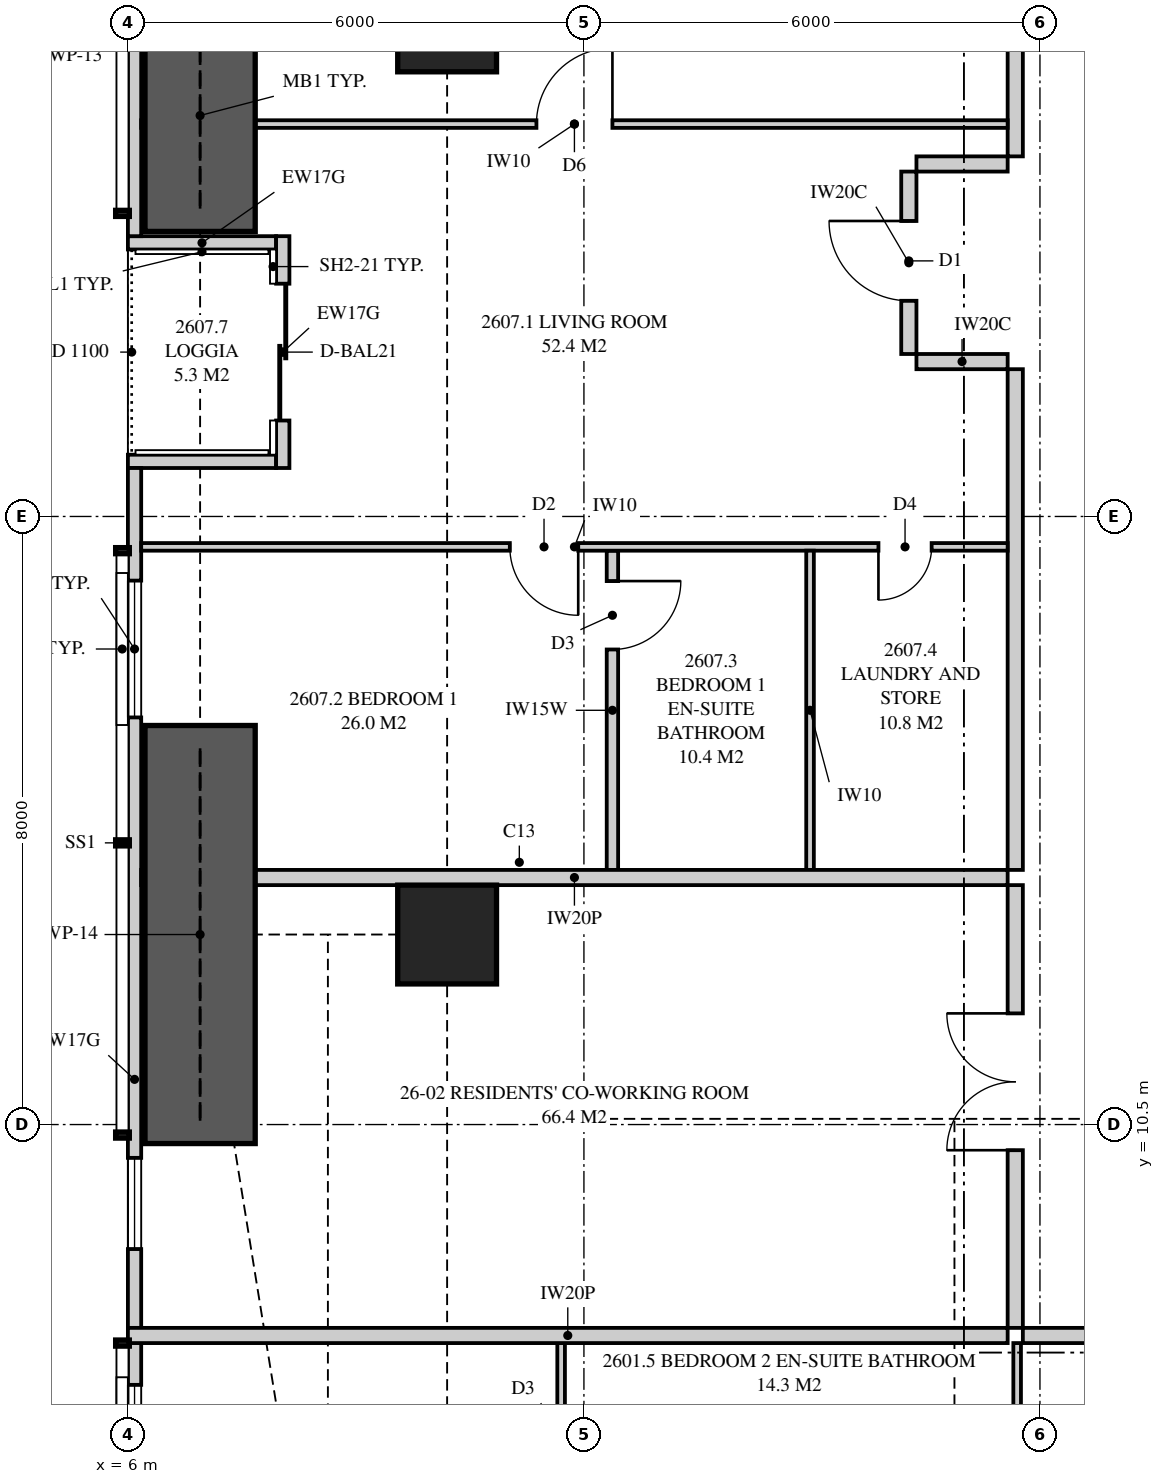
"""IFC4 building model, lengths in metres.
Left out: names, types, materials, properties, quantities, classifications, styles, units other than length and angle.
Written with IfcOpenShell. Run it as: python <this file> out.ifc"""

import sys

from ifc_helpers import new_model, si_unit, direction, frame, frame_2d, origin, origin_2d, place, context, subcontext, project, spatial, polyline, rectangle, outline, extrude, element, fill, save


model = new_model("IFC4")
c1 = context("Model", 3, precision=1e-05, world=origin(), true_north=direction((0.0, 1.0)))
c2 = subcontext(c1, "Body", "Model", "MODEL_VIEW")
j1 = project(units=[si_unit("LENGTHUNIT", "METRE"), si_unit("PLANEANGLEUNIT", "RADIAN")], contexts=[c1])
p1 = place(None, origin())
s1 = spatial("IfcSite", under=j1, at=p1, CompositionType="ELEMENT")
p2 = place(p1, origin())
s2 = spatial("IfcBuilding", under=s1, at=p2, CompositionType="ELEMENT")
p3 = place(p2, frame((0.0, 0.0, 98.15)))
s3 = spatial("IfcBuildingStorey", under=s2, at=p3, CompositionType="ELEMENT", Elevation=98.15)
for number, where, z_axis, x_axis in (
    (1, (10.2, 13.0, 0.0), (0.0, 0.0, 1.0), (1.0, 0.0, 0.0)),
    (2, (10.2, 25.0, 0.0), (0.0, 0.0, 1.0), (1.0, 0.0, 0.0)),
):
    element("IfcColumn", number, at=place(p3, frame(where, z_axis=z_axis, x_axis=x_axis)), inside=s3, PredefinedType="COLUMN", context=c2, shape_type="SweptSolid", body=[
        extrude(rectangle(XDim=1.3, YDim=1.3, at=origin_2d()), origin(), (0.0, 0.0, 1.0), 3.35),
    ])
p4 = place(p3, frame((6.087, 34.949, 0.0), z_axis=(0.0, 0.0, 1.0), x_axis=(0.0, -1.0, 0.0)))
e3 = element("IfcWall", 3, at=p4, inside=s3, PredefinedType="SOLIDWALL", context=c2, shape_type="SweptSolid", body=[
    extrude(outline(polyline([(0.0, 0.0), (12.761, 0.0), (12.761, 2.15), (9.949, 2.15), (9.949, 3.11), (9.823, 3.11), (9.823, 2.15), (9.73, 2.15), (9.73, 3.11), (0.0, 3.11), (0.0, 0.0)])), frame((0.0, 0.087, 0.0), z_axis=(0.0, -1.0, 0.0), x_axis=(1.0, 0.0, 0.0)), (0.0, 0.0, 1.0), 0.175),
])
p5 = place(p4, frame((2.724, 0.0, 0.4)))
e4 = element("IfcOpeningElement", 4, at=p5, cuts=e3, PredefinedType="OPENING", context=c2, shape_type="SweptSolid", body=[
    extrude(rectangle(XDim=1.8, YDim=1.7, at=frame_2d((0.9, 0.85))), frame((0.0, 0.097, 0.0), z_axis=(0.0, -1.0, 0.0), x_axis=(1.0, 0.0, 0.0)), (0.0, 0.0, 1.0), 0.195),
])
p6 = place(p4, frame((5.874, 0.0, 0.4)))
e5 = element("IfcOpeningElement", 5, at=p6, cuts=e3, PredefinedType="OPENING", context=c2, shape_type="SweptSolid", body=[
    extrude(rectangle(XDim=1.2, YDim=1.7, at=frame_2d((0.6, 0.85))), frame((0.0, 0.097, 0.0), z_axis=(0.0, -1.0, 0.0), x_axis=(1.0, 0.0, 0.0)), (0.0, 0.0, 1.0), 0.195),
])
p7 = place(p3, frame((6.087, 19.137, 0.0), z_axis=(0.0, 0.0, 1.0), x_axis=(0.0, -1.0, 0.0)))
e6 = element("IfcWall", 6, at=p7, inside=s3, PredefinedType="SOLIDWALL", context=c2, shape_type="SweptSolid", body=[
    extrude(outline(polyline([(0.0, 0.0), (16.086, 0.0), (16.086, 3.11), (6.356, 3.11), (6.356, 2.15), (6.263, 2.15), (6.263, 3.11), (6.137, 3.11), (6.137, 2.15), (0.0, 2.15), (0.0, 0.0)])), frame((0.0, 0.087, 0.0), z_axis=(0.0, -1.0, 0.0), x_axis=(1.0, 0.0, 0.0)), (0.0, 0.0, 1.0), 0.175),
])
p8 = place(p7, frame((1.481, 0.0, 0.4)))
e7 = element("IfcOpeningElement", 7, at=p8, cuts=e6, PredefinedType="OPENING", context=c2, shape_type="SweptSolid", body=[
    extrude(rectangle(XDim=1.8, YDim=1.7, at=frame_2d((0.9, 0.85))), frame((0.0, 0.097, 0.0), z_axis=(0.0, -1.0, 0.0), x_axis=(1.0, 0.0, 0.0)), (0.0, 0.0, 1.0), 0.195),
])
p9 = place(p7, frame((9.076, 0.0, 0.4)))
e8 = element("IfcOpeningElement", 8, at=p9, cuts=e6, PredefinedType="OPENING", context=c2, shape_type="SweptSolid", body=[
    extrude(rectangle(XDim=1.2, YDim=1.7, at=frame_2d((0.6, 0.85))), frame((0.0, 0.097, 0.0), z_axis=(0.0, -1.0, 0.0), x_axis=(1.0, 0.0, 0.0)), (0.0, 0.0, 1.0), 0.195),
])
p10 = place(p7, frame((12.062, 0.0, 0.4)))
e9 = element("IfcOpeningElement", 9, at=p10, cuts=e6, PredefinedType="OPENING", context=c2, shape_type="SweptSolid", body=[
    extrude(rectangle(XDim=1.8, YDim=1.7, at=frame_2d((0.9, 0.85))), frame((0.0, 0.097, 0.0), z_axis=(0.0, -1.0, 0.0), x_axis=(1.0, 0.0, 0.0)), (0.0, 0.0, 1.0), 0.195),
])
p11 = place(p3, frame((8.038, 22.188, 0.0), z_axis=(0.0, 0.0, 1.0), x_axis=(0.0, -1.0, 0.0)))
e10 = element("IfcWall", 10, at=p11, inside=s3, PredefinedType="SOLIDWALL", context=c2, shape_type="SweptSolid", body=[
    extrude(rectangle(XDim=3.05, YDim=0.175, at=frame_2d((1.525, 0.0))), origin(), (0.0, 0.0, 1.0), 3.11),
])
p12 = place(p11, frame((0.625, 0.0, 0.0)))
e11 = element("IfcOpeningElement", 11, at=p12, cuts=e10, PredefinedType="OPENING", context=c2, shape_type="SweptSolid", body=[
    extrude(rectangle(XDim=1.8, YDim=2.1, at=frame_2d((0.9, 1.05))), frame((0.0, 0.097, 0.0), z_axis=(0.0, -1.0, 0.0), x_axis=(1.0, 0.0, 0.0)), (0.0, 0.0, 1.0), 0.195),
])
for number, where, z_axis, x_axis in (
    (12, (6.0, 22.1, 0.0), (0.0, 0.0, 1.0), (1.0, 0.0, 0.0)),
    (13, (6.0, 19.225, 0.0), (0.0, 0.0, 1.0), (1.0, 0.0, 0.0)),
):
    element("IfcWall", number, at=place(p3, frame(where, z_axis=z_axis, x_axis=x_axis)), inside=s3, PredefinedType="SOLIDWALL", context=c2, shape_type="SweptSolid", body=[
        extrude(outline(polyline([(0.0, 0.0), (1.95, 0.0), (1.95, 3.11), (1.75, 3.11), (1.75, 2.15), (0.15, 2.15), (0.15, 3.11), (0.0, 3.11), (0.0, 0.0)])), frame((0.0, 0.087, 0.0), z_axis=(0.0, -1.0, 0.0), x_axis=(1.0, 0.0, 0.0)), (0.0, 0.0, 1.0), 0.175),
    ])
p13 = place(p3, frame((17.775, 7.725, 0.0), z_axis=(0.0, 0.0, 1.0), x_axis=(1.0, 0.0, 0.0)))
e14 = element("IfcWall", 14, at=p13, inside=s3, PredefinedType="PARTITIONING", context=c2, shape_type="SweptSolid", body=[
    extrude(rectangle(XDim=4.325, YDim=0.2, at=frame_2d((2.163, 0.0))), origin(), (0.0, 0.0, 1.0), 3.11),
])
p14 = place(p3, frame((11.7, 0.175, 0.0), z_axis=(0.0, 0.0, 1.0), x_axis=(0.0, 1.0, 0.0)))
e15 = element("IfcWall", 15, at=p14, inside=s3, PredefinedType="PARTITIONING", context=c2, shape_type="SweptSolid", body=[
    extrude(outline(polyline([(0.0, 0.0), (7.45, 0.0), (7.45, 3.11), (2.708, 3.11), (2.708, 2.15), (0.953, 2.15), (0.953, 3.11), (0.0, 3.11), (0.0, 0.0)])), frame((0.0, 0.05, 0.0), z_axis=(0.0, -1.0, 0.0), x_axis=(1.0, 0.0, 0.0)), (0.0, 0.0, 1.0), 0.1),
])
p15 = place(p14, frame((2.701, 0.0, 0.0)))
e16 = element("IfcOpeningElement", 16, at=p15, cuts=e15, PredefinedType="OPENING", context=c2, shape_type="SweptSolid", body=[
    extrude(rectangle(XDim=0.9, YDim=2.1, at=frame_2d((0.45, 1.05))), frame((0.0, 0.06, 0.0), z_axis=(0.0, -1.0, 0.0), x_axis=(1.0, 0.0, 0.0)), (0.0, 0.0, 1.0), 0.12),
])
p16 = place(p14, frame((5.525, 0.0, 0.0)))
e17 = element("IfcOpeningElement", 17, at=p16, cuts=e15, PredefinedType="OPENING", context=c2, shape_type="SweptSolid", body=[
    extrude(rectangle(XDim=0.9, YDim=2.1, at=frame_2d((0.45, 1.05))), frame((0.0, 0.06, 0.0), z_axis=(0.0, -1.0, 0.0), x_axis=(1.0, 0.0, 0.0)), (0.0, 0.0, 1.0), 0.12),
])
p17 = place(p3, frame((17.7, 0.175, 0.0), z_axis=(0.0, 0.0, 1.0), x_axis=(0.0, 1.0, 0.0)))
e18 = element("IfcWall", 18, at=p17, inside=s3, PredefinedType="PARTITIONING", context=c2, shape_type="SweptSolid", body=[
    extrude(outline(polyline([(1.635, 2.15), (0.0, 2.15), (0.0, 0.0), (7.45, 0.0), (7.45, 3.11), (1.635, 3.11), (1.635, 2.15)]), holes=[polyline([(1.021, 0.116), (0.529, 0.116), (0.529, 0.906), (1.021, 0.906), (1.021, 0.116)]), polyline([(1.021, 1.244), (0.529, 1.244), (0.529, 2.034), (1.021, 2.034), (1.021, 1.244)])]), frame((0.0, 0.05, 0.0), z_axis=(0.0, -1.0, 0.0), x_axis=(1.0, 0.0, 0.0)), (0.0, 0.0, 1.0), 0.1),
])
p18 = place(p17, frame((3.6, 0.0, 0.0)))
e19 = element("IfcOpeningElement", 19, at=p18, cuts=e18, PredefinedType="OPENING", context=c2, shape_type="SweptSolid", body=[
    extrude(rectangle(XDim=0.9, YDim=2.1, at=frame_2d((0.45, 1.05))), frame((0.0, 0.06, 0.0), z_axis=(0.0, -1.0, 0.0), x_axis=(1.0, 0.0, 0.0)), (0.0, 0.0, 1.0), 0.12),
])
p19 = place(p3, frame((6.0, 7.725, 0.0), z_axis=(0.0, 0.0, 1.0), x_axis=(1.0, 0.0, 0.0)))
e20 = element("IfcWall", 20, at=p19, inside=s3, PredefinedType="PARTITIONING", context=c2, shape_type="SweptSolid", body=[
    extrude(outline(polyline([(0.0, 0.0), (11.575, 0.0), (11.575, 3.11), (11.212, 3.11), (11.212, 2.541), (10.538, 2.541), (10.538, 3.11), (5.51, 3.11), (5.51, 2.51), (2.969, 2.51), (2.969, 2.541), (2.727, 2.541), (2.727, 2.15), (0.884, 2.15), (0.884, 3.11), (0.0, 3.11), (0.0, 0.0)])), frame((0.0, 0.1, 0.0), z_axis=(0.0, -1.0, 0.0), x_axis=(1.0, 0.0, 0.0)), (0.0, 0.0, 1.0), 0.2),
])
p20 = place(p3, frame((6.175, 13.75, 0.0), z_axis=(0.0, 0.0, 1.0), x_axis=(1.0, 0.0, 0.0)))
e21 = element("IfcWall", 21, at=p20, inside=s3, PredefinedType="PARTITIONING", context=c2, shape_type="SweptSolid", body=[
    extrude(outline(polyline([(1.685, 2.15), (0.0, 2.15), (0.0, 0.0), (11.4, 0.0), (11.4, 3.11), (5.335, 3.11), (5.335, 2.51), (2.715, 2.51), (2.715, 3.11), (1.685, 3.11), (1.685, 2.15)]), holes=[polyline([(1.021, 0.133), (0.529, 0.133), (0.529, 0.991), (1.021, 0.991), (1.021, 0.133)]), polyline([(1.021, 1.159), (0.529, 1.159), (0.529, 2.017), (1.021, 2.017), (1.021, 1.159)])]), frame((0.0, 0.1, 0.0), z_axis=(0.0, -1.0, 0.0), x_axis=(1.0, 0.0, 0.0)), (0.0, 0.0, 1.0), 0.2),
])
p21 = place(p3, frame((17.675, 7.825, 0.0), z_axis=(0.0, 0.0, 1.0), x_axis=(0.0, 1.0, 0.0)))
e22 = element("IfcWall", 22, at=p21, inside=s3, PredefinedType="PARTITIONING", context=c2, shape_type="SweptSolid", body=[
    extrude(outline(polyline([(0.0, 0.0), (5.825, 0.0), (5.825, 3.11), (3.087, 3.11), (3.087, 2.541), (2.413, 2.541), (2.413, 3.11), (0.0, 3.11), (0.0, 0.0)])), frame((0.0, 0.1, 0.0), z_axis=(0.0, -1.0, 0.0), x_axis=(1.0, 0.0, 0.0)), (0.0, 0.0, 1.0), 0.2),
])
p22 = place(p21, frame((2.337, 0.0, 0.0)))
e23 = element("IfcOpeningElement", 23, at=p22, cuts=e22, PredefinedType="OPENING", context=c2, shape_type="SweptSolid", body=[
    extrude(rectangle(XDim=1.8, YDim=2.1, at=frame_2d((0.9, 1.05))), frame((0.0, 0.11, 0.0), z_axis=(0.0, -1.0, 0.0), x_axis=(1.0, 0.0, 0.0)), (0.0, 0.0, 1.0), 0.22),
])
p23 = place(p3, frame((17.675, 13.85, 0.0), z_axis=(0.0, 0.0, 1.0), x_axis=(0.0, 1.0, 0.0)))
e24 = element("IfcWall", 24, at=p23, inside=s3, PredefinedType="PARTITIONING", context=c2, shape_type="SweptSolid", body=[
    extrude(rectangle(XDim=6.587, YDim=0.2, at=frame_2d((3.294, 0.0))), origin(), (0.0, 0.0, 1.0), 3.11),
])
p24 = place(p3, frame((6.175, 18.1, 0.0), z_axis=(0.0, 0.0, 1.0), x_axis=(1.0, 0.0, 0.0)))
e25 = element("IfcWall", 25, at=p24, inside=s3, PredefinedType="PARTITIONING", context=c2, shape_type="SweptSolid", body=[
    extrude(outline(polyline([(0.0, 0.0), (11.4, 0.0), (11.4, 3.11), (5.285, 3.11), (5.285, 2.51), (2.765, 2.51), (2.765, 3.11), (1.635, 3.11), (1.635, 2.15), (0.0, 2.15), (0.0, 3.11), (0.0, 0.0)])), frame((0.0, 0.05, 0.0), z_axis=(0.0, -1.0, 0.0), x_axis=(1.0, 0.0, 0.0)), (0.0, 0.0, 1.0), 0.1),
])
p25 = place(p24, frame((4.85, 0.0, 0.0)))
e26 = element("IfcOpeningElement", 26, at=p25, cuts=e25, PredefinedType="OPENING", context=c2, shape_type="SweptSolid", body=[
    extrude(rectangle(XDim=0.9, YDim=2.1, at=frame_2d((0.45, 1.05))), frame((0.0, 0.06, 0.0), z_axis=(0.0, -1.0, 0.0), x_axis=(1.0, 0.0, 0.0)), (0.0, 0.0, 1.0), 0.12),
])
p26 = place(p24, frame((9.7, 0.0, 0.0)))
e27 = element("IfcOpeningElement", 27, at=p26, cuts=e25, PredefinedType="OPENING", context=c2, shape_type="SweptSolid", body=[
    extrude(rectangle(XDim=0.7, YDim=2.1, at=frame_2d((0.35, 1.05))), frame((0.0, 0.06, 0.0), z_axis=(0.0, -1.0, 0.0), x_axis=(1.0, 0.0, 0.0)), (0.0, 0.0, 1.0), 0.12),
])
p27 = place(p3, frame((12.375, 13.85, 0.0), z_axis=(0.0, 0.0, 1.0), x_axis=(0.0, 1.0, 0.0)))
e28 = element("IfcWall", 28, at=p27, inside=s3, PredefinedType="PLUMBINGWALL", context=c2, shape_type="SweptSolid", body=[
    extrude(rectangle(XDim=4.2, YDim=0.15, at=frame_2d((2.1, 0.0))), origin(), (0.0, 0.0, 1.0), 3.11),
])
p28 = place(p27, frame((2.9, 0.0, 0.0)))
e29 = element("IfcOpeningElement", 29, at=p28, cuts=e28, PredefinedType="OPENING", context=c2, shape_type="SweptSolid", body=[
    extrude(rectangle(XDim=0.9, YDim=2.1, at=frame_2d((0.45, 1.05))), frame((0.0, 0.085, 0.0), z_axis=(0.0, -1.0, 0.0), x_axis=(1.0, 0.0, 0.0)), (0.0, 0.0, 1.0), 0.17),
])
p29 = place(p3, frame((14.975, 13.85, 0.0), z_axis=(0.0, 0.0, 1.0), x_axis=(0.0, 1.0, 0.0)))
e30 = element("IfcWall", 30, at=p29, inside=s3, PredefinedType="PARTITIONING", context=c2, shape_type="SweptSolid", body=[
    extrude(rectangle(XDim=4.2, YDim=0.1, at=frame_2d((2.1, 0.0))), origin(), (0.0, 0.0, 1.0), 3.11),
])
p30 = place(p3, frame((6.175, 23.663, 0.0), z_axis=(0.0, 0.0, 1.0), x_axis=(1.0, 0.0, 0.0)))
e31 = element("IfcWall", 31, at=p30, inside=s3, PredefinedType="PARTITIONING", context=c2, shape_type="SweptSolid", body=[
    extrude(outline(polyline([(0.529, 2.15), (0.0, 2.15), (0.0, 0.0), (0.529, 0.0), (0.529, 0.556), (1.021, 0.556), (1.021, 0.0), (11.4, 0.0), (11.4, 3.11), (5.285, 3.11), (5.285, 2.51), (2.765, 2.51), (2.765, 3.11), (1.635, 3.11), (1.635, 2.15), (1.021, 2.15), (1.021, 1.594), (0.529, 1.594), (0.529, 2.15)])), frame((0.0, 0.05, 0.0), z_axis=(0.0, -1.0, 0.0), x_axis=(1.0, 0.0, 0.0)), (0.0, 0.0, 1.0), 0.1),
])
p31 = place(p30, frame((5.2, 0.0, 0.0)))
e32 = element("IfcOpeningElement", 32, at=p31, cuts=e31, PredefinedType="OPENING", context=c2, shape_type="SweptSolid", body=[
    extrude(rectangle(XDim=1.0, YDim=2.1, at=frame_2d((0.5, 1.05))), frame((0.0, 0.06, 0.0), z_axis=(0.0, -1.0, 0.0), x_axis=(1.0, 0.0, 0.0)), (0.0, 0.0, 1.0), 0.12),
])
p32 = place(p3, frame((17.675, 23.238, 0.0), z_axis=(0.0, 0.0, 1.0), x_axis=(0.0, 1.0, 0.0)))
e33 = element("IfcWall", 33, at=p32, inside=s3, PredefinedType="PARTITIONING", context=c2, shape_type="SweptSolid", body=[
    extrude(outline(polyline([(0.0, 0.0), (5.938, 0.0), (5.938, 3.11), (3.525, 3.11), (3.525, 2.541), (2.85, 2.541), (2.85, 3.11), (0.0, 3.11), (0.0, 0.0)])), frame((0.0, 0.1, 0.0), z_axis=(0.0, -1.0, 0.0), x_axis=(1.0, 0.0, 0.0)), (0.0, 0.0, 1.0), 0.2),
])
p33 = place(p3, frame((16.275, 20.637, 0.0), z_axis=(0.0, 0.0, 1.0), x_axis=(0.0, 1.0, 0.0)))
e34 = element("IfcWall", 34, at=p33, inside=s3, PredefinedType="PARTITIONING", context=c2, shape_type="SweptSolid", body=[
    extrude(rectangle(XDim=2.4, YDim=0.2, at=frame_2d((1.2, 0.0))), origin(), (0.0, 0.0, 1.0), 3.11),
])
p34 = place(p33, frame((0.7, 0.0, 0.0)))
e35 = element("IfcOpeningElement", 35, at=p34, cuts=e34, PredefinedType="OPENING", context=c2, shape_type="SweptSolid", body=[
    extrude(rectangle(XDim=1.05, YDim=2.2, at=frame_2d((0.525, 1.1))), frame((0.0, 0.11, 0.0), z_axis=(0.0, -1.0, 0.0), x_axis=(1.0, 0.0, 0.0)), (0.0, 0.0, 1.0), 0.22),
])
for number, where, z_axis, x_axis in (
    (36, (17.575, 20.538, 0.0), (0.0, 0.0, 1.0), (-1.0, 0.0, 0.0)),
    (37, (17.575, 23.137, 0.0), (0.0, 0.0, 1.0), (-1.0, 0.0, 0.0)),
):
    element("IfcWall", number, at=place(p3, frame(where, z_axis=z_axis, x_axis=x_axis)), inside=s3, PredefinedType="PARTITIONING", context=c2, shape_type="SweptSolid", body=[
        extrude(rectangle(XDim=1.2, YDim=0.2, at=frame_2d((0.6, 0.0))), origin(), (0.0, 0.0, 1.0), 3.11),
    ])
for number, where, z_axis, x_axis in (
    (38, (6.95, 22.25, 0.0), (0.0, 0.0, 1.0), (0.0, 1.0, 0.0)),
    (39, (6.95, 10.25, 0.0), (0.0, 0.0, 1.0), (0.0, 1.0, 0.0)),
):
    element("IfcWall", number, at=place(p3, frame(where, z_axis=z_axis, x_axis=x_axis)), inside=s3, PredefinedType="SHEAR", context=c2, shape_type="SweptSolid", body=[
        extrude(rectangle(XDim=5.5, YDim=1.45, at=frame_2d((2.75, 0.0))), origin(), (0.0, 0.0, 1.0), 3.35),
    ])
p35 = place(p12, origin())
e40 = element("IfcDoor", 40, at=p35, inside=s3, OperationType="SLIDING_TO_LEFT", PredefinedType="DOOR", context=c2, shape_type="SweptSolid", body=[
    extrude(rectangle(XDim=1.8, YDim=2.1, at=frame_2d((0.9, 1.05))), frame((0.0, 0.025, 0.0), z_axis=(0.0, -1.0, 0.0), x_axis=(1.0, 0.0, 0.0)), (0.0, 0.0, 1.0), 0.05),
])
fill(e11, e40)
p36 = place(p8, origin())
e41 = element("IfcWindow", 41, at=p36, inside=s3, PartitioningType="SINGLE_PANEL", PredefinedType="WINDOW", context=c2, shape_type="SweptSolid", body=[
    extrude(rectangle(XDim=1.8, YDim=1.7, at=frame_2d((0.9, 0.85))), frame((0.0, 0.03, 0.0), z_axis=(0.0, -1.0, 0.0), x_axis=(1.0, 0.0, 0.0)), (0.0, 0.0, 1.0), 0.06),
])
fill(e7, e41)
p37 = place(p9, origin())
e42 = element("IfcWindow", 42, at=p37, inside=s3, PartitioningType="SINGLE_PANEL", PredefinedType="WINDOW", context=c2, shape_type="SweptSolid", body=[
    extrude(rectangle(XDim=1.2, YDim=1.7, at=frame_2d((0.6, 0.85))), frame((0.0, 0.03, 0.0), z_axis=(0.0, -1.0, 0.0), x_axis=(1.0, 0.0, 0.0)), (0.0, 0.0, 1.0), 0.06),
])
fill(e8, e42)
p38 = place(p10, origin())
e43 = element("IfcWindow", 43, at=p38, inside=s3, PartitioningType="SINGLE_PANEL", PredefinedType="WINDOW", context=c2, shape_type="SweptSolid", body=[
    extrude(rectangle(XDim=1.8, YDim=1.7, at=frame_2d((0.9, 0.85))), frame((0.0, 0.03, 0.0), z_axis=(0.0, -1.0, 0.0), x_axis=(1.0, 0.0, 0.0)), (0.0, 0.0, 1.0), 0.06),
])
fill(e9, e43)
p39 = place(p22, origin())
e44 = element("IfcDoor", 44, at=p39, inside=s3, OperationType="DOUBLE_DOOR_SINGLE_SWING", PredefinedType="DOOR", context=c2, shape_type="SweptSolid", body=[
    extrude(rectangle(XDim=1.8, YDim=2.1, at=frame_2d((0.9, 1.05))), frame((0.0, 0.025, 0.0), z_axis=(0.0, -1.0, 0.0), x_axis=(1.0, 0.0, 0.0)), (0.0, 0.0, 1.0), 0.05),
])
fill(e23, e44)
p40 = place(p34, origin())
e45 = element("IfcDoor", 45, at=p40, inside=s3, OperationType="SINGLE_SWING_RIGHT", PredefinedType="DOOR", context=c2, shape_type="SweptSolid", body=[
    extrude(rectangle(XDim=1.05, YDim=2.2, at=frame_2d((0.525, 1.1))), frame((0.0, 0.025, 0.0), z_axis=(0.0, -1.0, 0.0), x_axis=(1.0, 0.0, 0.0)), (0.0, 0.0, 1.0), 0.05),
])
fill(e35, e45)
p41 = place(p25, frame((0.9, 0.0, 0.0), z_axis=(0.0, 0.0, 1.0), x_axis=(-1.0, 0.0, 0.0)))
e46 = element("IfcDoor", 46, at=p41, inside=s3, OperationType="SINGLE_SWING_LEFT", PredefinedType="DOOR", context=c2, shape_type="SweptSolid", body=[
    extrude(rectangle(XDim=0.9, YDim=2.1, at=frame_2d((0.45, 1.05))), frame((0.0, 0.025, 0.0), z_axis=(0.0, -1.0, 0.0), x_axis=(1.0, 0.0, 0.0)), (0.0, 0.0, 1.0), 0.05),
])
fill(e26, e46)
p42 = place(p28, frame((0.9, 0.0, 0.0), z_axis=(0.0, 0.0, 1.0), x_axis=(-1.0, 0.0, 0.0)))
e47 = element("IfcDoor", 47, at=p42, inside=s3, OperationType="SINGLE_SWING_LEFT", PredefinedType="DOOR", context=c2, shape_type="SweptSolid", body=[
    extrude(rectangle(XDim=0.9, YDim=2.1, at=frame_2d((0.45, 1.05))), frame((0.0, 0.025, 0.0), z_axis=(0.0, -1.0, 0.0), x_axis=(1.0, 0.0, 0.0)), (0.0, 0.0, 1.0), 0.05),
])
fill(e29, e47)
p43 = place(p26, frame((0.7, 0.0, 0.0), z_axis=(0.0, 0.0, 1.0), x_axis=(-1.0, 0.0, 0.0)))
e48 = element("IfcDoor", 48, at=p43, inside=s3, OperationType="SINGLE_SWING_RIGHT", PredefinedType="DOOR", context=c2, shape_type="SweptSolid", body=[
    extrude(rectangle(XDim=0.7, YDim=2.1, at=frame_2d((0.35, 1.05))), frame((0.0, 0.025, 0.0), z_axis=(0.0, -1.0, 0.0), x_axis=(1.0, 0.0, 0.0)), (0.0, 0.0, 1.0), 0.05),
])
fill(e27, e48)
p44 = place(p31, origin())
e49 = element("IfcDoor", 49, at=p44, inside=s3, OperationType="SINGLE_SWING_RIGHT", PredefinedType="DOOR", context=c2, shape_type="SweptSolid", body=[
    extrude(rectangle(XDim=1.0, YDim=2.1, at=frame_2d((0.5, 1.05))), frame((0.0, 0.025, 0.0), z_axis=(0.0, -1.0, 0.0), x_axis=(1.0, 0.0, 0.0)), (0.0, 0.0, 1.0), 0.05),
])
fill(e32, e49)
save(model, sys.argv[1])
